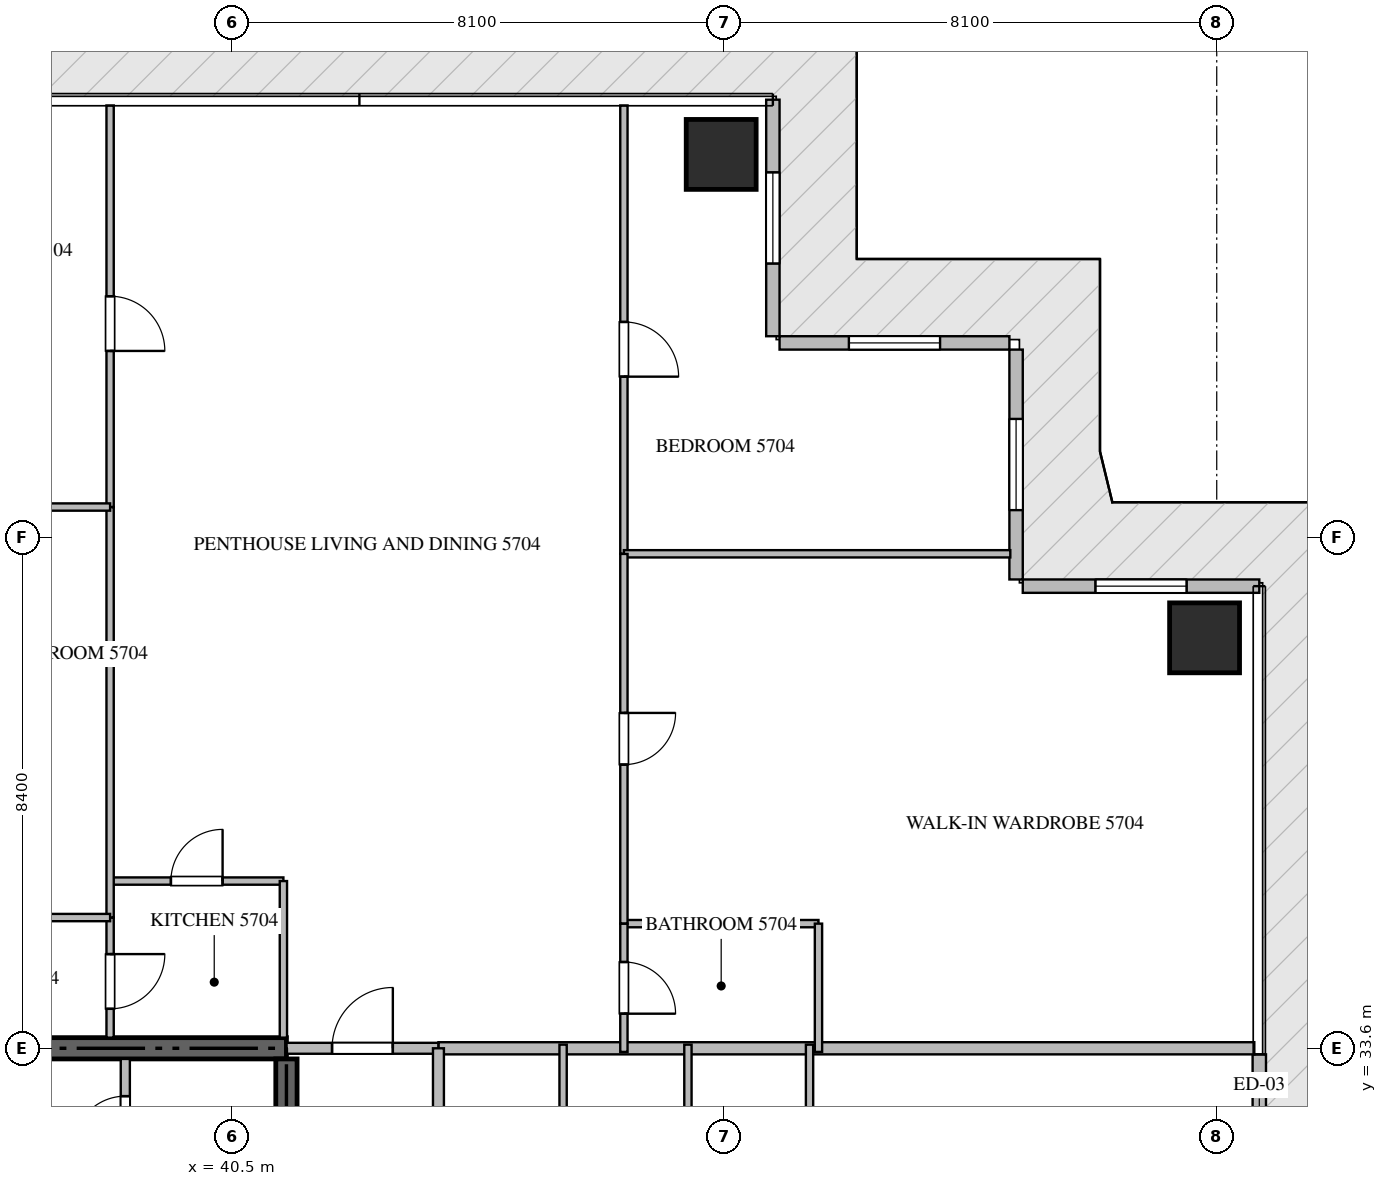
"""IFC4 building model, lengths in metres.
Left out: names, types, materials, properties, quantities, classifications, styles, units other than length and angle.
Written with IfcOpenShell. Run it as: python <this file> out.ifc"""

import sys

from ifc_helpers import new_model, si_unit, direction, frame, frame_2d, origin, origin_2d, place, context, subcontext, project, spatial, rectangle, extrude, source, transform, mapped, element, fill, save


model = new_model("IFC4")
c1 = context("Model", 3, precision=1e-05, world=origin(), true_north=direction((0.0, 1.0)))
c2 = subcontext(c1, "Body", "Model", "MODEL_VIEW")
j1 = project(units=[si_unit("LENGTHUNIT", "METRE"), si_unit("PLANEANGLEUNIT", "RADIAN")], contexts=[c1])
p1 = place(None, origin())
s1 = spatial("IfcSite", under=j1, at=p1, CompositionType="ELEMENT")
p2 = place(p1, origin())
s2 = spatial("IfcBuilding", under=s1, at=p2, CompositionType="ELEMENT")
p3 = place(p2, frame((0.0, 0.0, 229.7)))
s3 = spatial("IfcBuildingStorey", under=s2, at=p3, CompositionType="ELEMENT", Elevation=229.7)
p4 = place(p3, frame((41.4, 33.6, -0.26), z_axis=(0.0, 0.0, 1.0), x_axis=(-1.0, 0.0, 0.0)))
e1 = element("IfcWall", 1, at=p4, inside=s3, PredefinedType="SHEAR", context=c2, shape_type="SweptSolid", body=[
    extrude(rectangle(XDim=18.0, YDim=0.35, at=frame_2d((9.0, 0.0))), origin(), (0.0, 0.0, 1.0), 3.848),
])
p5 = place(p3, frame((41.4, 27.75, -0.26), z_axis=(0.0, 0.0, 1.0), x_axis=(0.0, 1.0, 0.0)))
e2 = element("IfcWall", 2, at=p5, inside=s3, PredefinedType="SHEAR", context=c2, shape_type="SweptSolid", body=[
    extrude(rectangle(XDim=5.675, YDim=0.35, at=frame_2d((2.837, 0.0))), origin(), (0.0, 0.0, 1.0), 3.848),
])
m1 = source(origin(), c2, "Body", "SweptSolid", [
    extrude(rectangle(XDim=1.15, YDim=1.15, at=origin_2d()), origin(), (0.0, 0.0, 1.0), 3.85),
])
for number, where, z_axis, x_axis in (
    (3, (48.55, 48.3, -0.26), (0.0, 0.0, 1.0), (1.0, 0.0, 0.0)),
    (4, (56.5, 40.35, -0.26), (0.0, 0.0, 1.0), (1.0, 0.0, 0.0)),
):
    element("IfcColumn", number, at=place(p3, frame(where, z_axis=z_axis, x_axis=x_axis)), inside=s3, PredefinedType="COLUMN", context=c2, shape_type="MappedRepresentation", body=[
        mapped(m1, transform((0.0, 0.0, 0.0), scale=1.0)),
    ])
p6 = place(p3, frame((57.4, 30.5, 0.0), z_axis=(0.0, 0.0, 1.0), x_axis=(0.0, 1.0, 0.0)))
e5 = element("IfcWall", 5, at=p6, inside=s3, PredefinedType="ELEMENTEDWALL", context=c2, shape_type="SweptSolid", body=[
    extrude(rectangle(XDim=3.0, YDim=0.22, at=frame_2d((1.5, 0.0))), origin(), (0.0, 0.0, 1.0), 3.575),
])
p7 = place(p6, frame((0.95, 0.0, 0.0)))
e6 = element("IfcOpeningElement", 6, at=p7, cuts=e5, PredefinedType="OPENING", context=c2, shape_type="SweptSolid", body=[
    extrude(rectangle(XDim=1.1, YDim=2.2, at=frame_2d((0.55, 1.1))), frame((0.0, 0.12, 0.0), z_axis=(0.0, -1.0, 0.0), x_axis=(1.0, 0.0, 0.0)), (0.0, 0.0, 1.0), 0.24),
])
p8 = place(p3, frame((57.4, 41.2, 0.0), z_axis=(0.0, 0.0, 1.0), x_axis=(-1.0, 0.0, 0.0)))
e7 = element("IfcWall", 7, at=p8, inside=s3, PredefinedType="ELEMENTEDWALL", context=c2, shape_type="SweptSolid", body=[
    extrude(rectangle(XDim=3.89, YDim=0.22, at=frame_2d((1.945, 0.0))), origin(), (0.0, 0.0, 1.0), 3.575),
])
p9 = place(p8, frame((1.195, 0.0, 0.65)))
e8 = element("IfcOpeningElement", 8, at=p9, cuts=e7, PredefinedType="OPENING", context=c2, shape_type="SweptSolid", body=[
    extrude(rectangle(XDim=1.5, YDim=2.25, at=frame_2d((0.75, 1.125))), frame((0.0, 0.12, 0.0), z_axis=(0.0, -1.0, 0.0), x_axis=(1.0, 0.0, 0.0)), (0.0, 0.0, 1.0), 0.24),
])
p10 = place(p3, frame((53.4, 41.31, 0.0), z_axis=(0.0, 0.0, 1.0), x_axis=(0.0, 1.0, 0.0)))
e9 = element("IfcWall", 9, at=p10, inside=s3, PredefinedType="ELEMENTEDWALL", context=c2, shape_type="SweptSolid", body=[
    extrude(rectangle(XDim=3.78, YDim=0.22, at=frame_2d((1.89, 0.0))), origin(), (0.0, 0.0, 1.0), 3.575),
])
p11 = place(p10, frame((1.14, 0.0, 0.65)))
e10 = element("IfcOpeningElement", 10, at=p11, cuts=e9, PredefinedType="OPENING", context=c2, shape_type="SweptSolid", body=[
    extrude(rectangle(XDim=1.5, YDim=2.25, at=frame_2d((0.75, 1.125))), frame((0.0, 0.12, 0.0), z_axis=(0.0, -1.0, 0.0), x_axis=(1.0, 0.0, 0.0)), (0.0, 0.0, 1.0), 0.24),
])
p12 = place(p3, frame((53.29, 45.2, 0.0), z_axis=(0.0, 0.0, 1.0), x_axis=(-1.0, 0.0, 0.0)))
e11 = element("IfcWall", 11, at=p12, inside=s3, PredefinedType="ELEMENTEDWALL", context=c2, shape_type="SweptSolid", body=[
    extrude(rectangle(XDim=3.78, YDim=0.22, at=frame_2d((1.89, 0.0))), origin(), (0.0, 0.0, 1.0), 3.575),
])
p13 = place(p12, frame((1.14, 0.0, 0.65)))
e12 = element("IfcOpeningElement", 12, at=p13, cuts=e11, PredefinedType="OPENING", context=c2, shape_type="SweptSolid", body=[
    extrude(rectangle(XDim=1.5, YDim=2.25, at=frame_2d((0.75, 1.125))), frame((0.0, 0.12, 0.0), z_axis=(0.0, -1.0, 0.0), x_axis=(1.0, 0.0, 0.0)), (0.0, 0.0, 1.0), 0.24),
])
p14 = place(p3, frame((49.4, 45.31, 0.0), z_axis=(0.0, 0.0, 1.0), x_axis=(0.0, 1.0, 0.0)))
e13 = element("IfcWall", 13, at=p14, inside=s3, PredefinedType="ELEMENTEDWALL", context=c2, shape_type="SweptSolid", body=[
    extrude(rectangle(XDim=3.89, YDim=0.22, at=frame_2d((1.945, 0.0))), origin(), (0.0, 0.0, 1.0), 3.575),
])
p15 = place(p14, frame((1.195, 0.0, 0.65)))
e14 = element("IfcOpeningElement", 14, at=p15, cuts=e13, PredefinedType="OPENING", context=c2, shape_type="SweptSolid", body=[
    extrude(rectangle(XDim=1.5, YDim=2.25, at=frame_2d((0.75, 1.125))), frame((0.0, 0.12, 0.0), z_axis=(0.0, -1.0, 0.0), x_axis=(1.0, 0.0, 0.0)), (0.0, 0.0, 1.0), 0.24),
])
p16 = place(p3, frame((38.75, 31.352, 0.0), z_axis=(0.0, 0.0, 1.0), x_axis=(0.0, 1.0, 0.0)))
e15 = element("IfcWall", 15, at=p16, inside=s3, PredefinedType="PARTITIONING", context=c2, shape_type="SweptSolid", body=[
    extrude(rectangle(XDim=2.073, YDim=0.15, at=frame_2d((1.037, 0.0))), origin(), (0.0, 0.0, 1.0), 3.59),
])
p17 = place(p16, frame((0.611, 0.0, 0.0)))
e16 = element("IfcOpeningElement", 16, at=p17, cuts=e15, PredefinedType="OPENING", context=c2, shape_type="SweptSolid", body=[
    extrude(rectangle(XDim=0.85, YDim=2.1, at=frame_2d((0.425, 1.05))), frame((0.0, 0.085, 0.0), z_axis=(0.0, -1.0, 0.0), x_axis=(1.0, 0.0, 0.0)), (0.0, 0.0, 1.0), 0.17),
])
p18 = place(p3, frame((43.9, 33.6, 0.0), z_axis=(0.0, 0.0, 1.0), x_axis=(1.0, 0.0, 0.0)))
e17 = element("IfcWall", 17, at=p18, inside=s3, PredefinedType="PARTITIONING", context=c2, shape_type="SweptSolid", body=[
    extrude(rectangle(XDim=13.418, YDim=0.2, at=frame_2d((6.709, 0.0))), origin(), (0.0, 0.0, 1.0), 3.59),
])
p19 = place(p3, frame((41.402, 33.6, 0.0), z_axis=(0.0, 0.0, 1.0), x_axis=(1.0, 0.0, 0.0)))
e18 = element("IfcWall", 18, at=p19, inside=s3, PredefinedType="PARTITIONING", context=c2, shape_type="SweptSolid", body=[
    extrude(rectangle(XDim=2.496, YDim=0.18, at=frame_2d((1.248, 0.0))), origin(), (0.0, 0.0, 1.0), 3.59),
])
p20 = place(p19, frame((0.748, 0.0, 0.0)))
e19 = element("IfcOpeningElement", 19, at=p20, cuts=e18, PredefinedType="OPENING", context=c2, shape_type="SweptSolid", body=[
    extrude(rectangle(XDim=1.0, YDim=2.15, at=frame_2d((0.5, 1.075))), frame((0.0, 0.1, 0.0), z_axis=(0.0, -1.0, 0.0), x_axis=(1.0, 0.0, 0.0)), (0.0, 0.0, 1.0), 0.2),
])
p21 = place(p3, frame((43.9, 16.8, 0.0), z_axis=(0.0, 0.0, 1.0), x_axis=(0.0, 1.0, 0.0)))
e20 = element("IfcWall", 20, at=p21, inside=s3, PredefinedType="PARTITIONING", context=c2, shape_type="SweptSolid", body=[
    extrude(rectangle(XDim=16.8, YDim=0.18, at=frame_2d((8.4, 0.0))), origin(), (0.0, 0.0, 1.0), 3.59),
])
p22 = place(p21, frame((4.392, 0.0, 0.0)))
e21 = element("IfcOpeningElement", 21, at=p22, cuts=e20, PredefinedType="OPENING", context=c2, shape_type="SweptSolid", body=[
    extrude(rectangle(XDim=1.0, YDim=2.15, at=frame_2d((0.5, 1.075))), frame((0.0, 0.1, 0.0), z_axis=(0.0, -1.0, 0.0), x_axis=(1.0, 0.0, 0.0)), (0.0, 0.0, 1.0), 0.2),
])
p23 = place(p21, frame((8.595, 0.0, 0.0)))
e22 = element("IfcOpeningElement", 22, at=p23, cuts=e20, PredefinedType="OPENING", context=c2, shape_type="SweptSolid", body=[
    extrude(rectangle(XDim=1.0, YDim=2.15, at=frame_2d((0.5, 1.075))), frame((0.0, 0.1, 0.0), z_axis=(0.0, -1.0, 0.0), x_axis=(1.0, 0.0, 0.0)), (0.0, 0.0, 1.0), 0.2),
])
p24 = place(p3, frame((38.5, 36.35, 0.0), z_axis=(0.0, 0.0, 1.0), x_axis=(1.0, 0.0, 0.0)))
e23 = element("IfcWall", 23, at=p24, inside=s3, PredefinedType="PARTITIONING", context=c2, shape_type="SweptSolid", body=[
    extrude(rectangle(XDim=2.85, YDim=0.12, at=frame_2d((1.425, 0.0))), origin(), (0.0, 0.0, 1.0), 3.59),
])
p25 = place(p24, frame((1.0, 0.0, 0.0)))
e24 = element("IfcOpeningElement", 24, at=p25, cuts=e23, PredefinedType="OPENING", context=c2, shape_type="SweptSolid", body=[
    extrude(rectangle(XDim=0.85, YDim=2.1, at=frame_2d((0.425, 1.05))), frame((0.0, 0.07, 0.0), z_axis=(0.0, -1.0, 0.0), x_axis=(1.0, 0.0, 0.0)), (0.0, 0.0, 1.0), 0.14),
])
p26 = place(p3, frame((41.35, 36.35, 0.0), z_axis=(0.0, 0.0, 1.0), x_axis=(0.0, -1.0, 0.0)))
e25 = element("IfcWall", 25, at=p26, inside=s3, PredefinedType="PARTITIONING", context=c2, shape_type="SweptSolid", body=[
    extrude(rectangle(XDim=2.575, YDim=0.12, at=frame_2d((1.288, 0.0))), origin(), (0.0, 0.0, 1.0), 3.59),
])
p27 = place(p3, frame((38.5, 35.75, 0.0), z_axis=(0.0, 0.0, 1.0), x_axis=(0.0, -1.0, 0.0)))
e26 = element("IfcWall", 26, at=p27, inside=s3, PredefinedType="PARTITIONING", context=c2, shape_type="SweptSolid", body=[
    extrude(rectangle(XDim=1.975, YDim=0.12, at=frame_2d((0.988, 0.0))), origin(), (0.0, 0.0, 1.0), 3.59),
])
p28 = place(p27, frame((0.601, 0.0, 0.0)))
e27 = element("IfcOpeningElement", 27, at=p28, cuts=e26, PredefinedType="OPENING", context=c2, shape_type="SweptSolid", body=[
    extrude(rectangle(XDim=0.9, YDim=2.1, at=frame_2d((0.45, 1.05))), frame((0.0, 0.07, 0.0), z_axis=(0.0, -1.0, 0.0), x_axis=(1.0, 0.0, 0.0)), (0.0, 0.0, 1.0), 0.14),
])
p29 = place(p3, frame((38.5, 49.105, 0.0), z_axis=(0.0, 0.0, 1.0), x_axis=(0.0, -1.0, 0.0)))
e28 = element("IfcWall", 28, at=p29, inside=s3, PredefinedType="PARTITIONING", context=c2, shape_type="SweptSolid", body=[
    extrude(rectangle(XDim=6.604, YDim=0.12, at=frame_2d((3.302, 0.0))), origin(), (0.0, 0.0, 1.0), 3.59),
])
p30 = place(p29, frame((3.137, 0.0, 0.0)))
e29 = element("IfcOpeningElement", 29, at=p30, cuts=e28, PredefinedType="OPENING", context=c2, shape_type="SweptSolid", body=[
    extrude(rectangle(XDim=0.9, YDim=2.1, at=frame_2d((0.45, 1.05))), frame((0.0, 0.07, 0.0), z_axis=(0.0, -1.0, 0.0), x_axis=(1.0, 0.0, 0.0)), (0.0, 0.0, 1.0), 0.14),
])
p31 = place(p3, frame((38.5, 42.499, 0.0), z_axis=(0.0, 0.0, 1.0), x_axis=(0.0, -1.0, 0.0)))
e30 = element("IfcWall", 30, at=p31, inside=s3, PredefinedType="PARTITIONING", context=c2, shape_type="SweptSolid", body=[
    extrude(rectangle(XDim=6.747, YDim=0.12, at=frame_2d((3.374, 0.0))), origin(), (0.0, 0.0, 1.0), 3.59),
])
p32 = place(p3, frame((33.38, 42.501, 0.0), z_axis=(0.0, 0.0, 1.0), x_axis=(1.0, 0.0, 0.0)))
e31 = element("IfcWall", 31, at=p32, inside=s3, PredefinedType="PARTITIONING", context=c2, shape_type="SweptSolid", body=[
    extrude(rectangle(XDim=5.12, YDim=0.12, at=frame_2d((2.56, 0.0))), origin(), (0.0, 0.0, 1.0), 3.59),
])
p33 = place(p3, frame((35.482, 35.75, 0.0), z_axis=(0.0, 0.0, 1.0), x_axis=(1.0, 0.0, 0.0)))
e32 = element("IfcWall", 32, at=p33, inside=s3, PredefinedType="PARTITIONING", context=c2, shape_type="SweptSolid", body=[
    extrude(rectangle(XDim=3.018, YDim=0.12, at=frame_2d((1.509, 0.0))), origin(), (0.0, 0.0, 1.0), 3.59),
])
p34 = place(p33, frame((1.084, 0.0, 0.0)))
e33 = element("IfcOpeningElement", 33, at=p34, cuts=e32, PredefinedType="OPENING", context=c2, shape_type="SweptSolid", body=[
    extrude(rectangle(XDim=0.85, YDim=2.1, at=frame_2d((0.425, 1.05))), frame((0.0, 0.07, 0.0), z_axis=(0.0, -1.0, 0.0), x_axis=(1.0, 0.0, 0.0)), (0.0, 0.0, 1.0), 0.14),
])
p35 = place(p3, frame((46.95, 49.105, 0.0), z_axis=(0.0, 0.0, 1.0), x_axis=(0.0, -1.0, 0.0)))
e34 = element("IfcWall", 34, at=p35, inside=s3, PredefinedType="PARTITIONING", context=c2, shape_type="SweptSolid", body=[
    extrude(rectangle(XDim=7.373, YDim=0.12, at=frame_2d((3.687, 0.0))), origin(), (0.0, 0.0, 1.0), 3.59),
])
p36 = place(p35, frame((3.56, 0.0, 0.0)))
e35 = element("IfcOpeningElement", 35, at=p36, cuts=e34, PredefinedType="OPENING", context=c2, shape_type="SweptSolid", body=[
    extrude(rectangle(XDim=0.9, YDim=2.1, at=frame_2d((0.45, 1.05))), frame((0.0, 0.07, 0.0), z_axis=(0.0, -1.0, 0.0), x_axis=(1.0, 0.0, 0.0)), (0.0, 0.0, 1.0), 0.14),
])
p37 = place(p3, frame((46.95, 41.732, 0.0), z_axis=(0.0, 0.0, 1.0), x_axis=(1.0, 0.0, 0.0)))
e36 = element("IfcWall", 36, at=p37, inside=s3, PredefinedType="PARTITIONING", context=c2, shape_type="SweptSolid", body=[
    extrude(rectangle(XDim=6.355, YDim=0.12, at=frame_2d((3.177, 0.0))), origin(), (0.0, 0.0, 1.0), 3.59),
])
p38 = place(p3, frame((46.95, 35.65, 0.0), z_axis=(0.0, 0.0, 1.0), x_axis=(1.0, 0.0, 0.0)))
e37 = element("IfcWall", 37, at=p38, inside=s3, PredefinedType="PARTITIONING", context=c2, shape_type="SweptSolid", body=[
    extrude(rectangle(XDim=3.2, YDim=0.12, at=frame_2d((1.6, 0.0))), origin(), (0.0, 0.0, 1.0), 3.59),
])
p39 = place(p3, frame((50.15, 35.65, 0.0), z_axis=(0.0, 0.0, 1.0), x_axis=(0.0, -1.0, 0.0)))
e38 = element("IfcWall", 38, at=p39, inside=s3, PredefinedType="PARTITIONING", context=c2, shape_type="SweptSolid", body=[
    extrude(rectangle(XDim=2.11, YDim=0.12, at=frame_2d((1.055, 0.0))), origin(), (0.0, 0.0, 1.0), 3.59),
])
p40 = place(p3, frame((46.95, 41.73, 0.0), z_axis=(0.0, 0.0, 1.0), x_axis=(0.0, -1.0, 0.0)))
e39 = element("IfcWall", 39, at=p40, inside=s3, PredefinedType="PARTITIONING", context=c2, shape_type="SweptSolid", body=[
    extrude(rectangle(XDim=6.08, YDim=0.12, at=frame_2d((3.04, 0.0))), origin(), (0.0, 0.0, 1.0), 3.59),
])
p41 = place(p40, frame((2.615, 0.0, 0.0)))
e40 = element("IfcOpeningElement", 40, at=p41, cuts=e39, PredefinedType="OPENING", context=c2, shape_type="SweptSolid", body=[
    extrude(rectangle(XDim=0.85, YDim=2.1, at=frame_2d((0.425, 1.05))), frame((0.0, 0.07, 0.0), z_axis=(0.0, -1.0, 0.0), x_axis=(1.0, 0.0, 0.0)), (0.0, 0.0, 1.0), 0.14),
])
p42 = place(p3, frame((46.95, 35.648, 0.0), z_axis=(0.0, 0.0, 1.0), x_axis=(0.0, -1.0, 0.0)))
e41 = element("IfcWall", 41, at=p42, inside=s3, PredefinedType="PARTITIONING", context=c2, shape_type="SweptSolid", body=[
    extrude(rectangle(XDim=2.108, YDim=0.12, at=frame_2d((1.054, 0.0))), origin(), (0.0, 0.0, 1.0), 3.59),
])
p43 = place(p42, frame((0.629, 0.0, 0.0)))
e42 = element("IfcOpeningElement", 42, at=p43, cuts=e41, PredefinedType="OPENING", context=c2, shape_type="SweptSolid", body=[
    extrude(rectangle(XDim=0.85, YDim=2.1, at=frame_2d((0.425, 1.05))), frame((0.0, 0.07, 0.0), z_axis=(0.0, -1.0, 0.0), x_axis=(1.0, 0.0, 0.0)), (0.0, 0.0, 1.0), 0.14),
])
for number, where, z_axis, x_axis in (
    (43, (50.003, 27.8, 0.0), (0.0, 0.0, 1.0), (0.0, 1.0, 0.0)),
    (44, (48.003, 27.8, 0.0), (0.0, 0.0, 1.0), (0.0, 1.0, 0.0)),
    (45, (45.95, 27.8, 0.0), (0.0, 0.0, 1.0), (0.0, 1.0, 0.0)),
):
    element("IfcWall", number, at=place(p3, frame(where, z_axis=z_axis, x_axis=x_axis)), inside=s3, PredefinedType="PARTITIONING", context=c2, shape_type="SweptSolid", body=[
        extrude(rectangle(XDim=5.86, YDim=0.12, at=frame_2d((2.93, 0.0))), origin(), (0.0, 0.0, 1.0), 3.59),
    ])
m2 = source(origin(), c2, "Body", "SweptSolid", [
    extrude(rectangle(XDim=1.5, YDim=2.25, at=frame_2d((0.75, 1.125))), frame((0.0, 0.03, 0.0), z_axis=(0.0, -1.0, 0.0), x_axis=(1.0, 0.0, 0.0)), (0.0, 0.0, 1.0), 0.06),
])
p44 = place(p9, origin())
e46 = element("IfcWindow", 46, at=p44, inside=s3, PartitioningType="SINGLE_PANEL", PredefinedType="WINDOW", context=c2, shape_type="MappedRepresentation", body=[
    mapped(m2, transform((0.0, 0.0, 0.0), scale=1.0)),
])
fill(e8, e46)
p45 = place(p11, origin())
e47 = element("IfcWindow", 47, at=p45, inside=s3, PartitioningType="SINGLE_PANEL", PredefinedType="WINDOW", context=c2, shape_type="MappedRepresentation", body=[
    mapped(m2, transform((0.0, 0.0, 0.0), scale=1.0)),
])
fill(e10, e47)
p46 = place(p13, origin())
e48 = element("IfcWindow", 48, at=p46, inside=s3, PartitioningType="SINGLE_PANEL", PredefinedType="WINDOW", context=c2, shape_type="MappedRepresentation", body=[
    mapped(m2, transform((0.0, 0.0, 0.0), scale=1.0)),
])
fill(e12, e48)
p47 = place(p15, origin())
e49 = element("IfcWindow", 49, at=p47, inside=s3, PartitioningType="SINGLE_PANEL", PredefinedType="WINDOW", context=c2, shape_type="MappedRepresentation", body=[
    mapped(m2, transform((0.0, 0.0, 0.0), scale=1.0)),
])
fill(e14, e49)
m3 = source(origin(), c2, "Body", "SweptSolid", [
    extrude(rectangle(XDim=0.85, YDim=2.1, at=frame_2d((0.425, 1.05))), frame((0.0, 0.025, 0.0), z_axis=(0.0, -1.0, 0.0), x_axis=(1.0, 0.0, 0.0)), (0.0, 0.0, 1.0), 0.05),
])
p48 = place(p17, origin())
e50 = element("IfcDoor", 50, at=p48, inside=s3, OperationType="SINGLE_SWING_LEFT", PredefinedType="DOOR", context=c2, shape_type="MappedRepresentation", body=[
    mapped(m3, transform((0.0, 0.0, 0.0), scale=1.0)),
])
fill(e16, e50)
m4 = source(origin(), c2, "Body", "SweptSolid", [
    extrude(rectangle(XDim=1.0, YDim=2.15, at=frame_2d((0.5, 1.075))), frame((0.0, 0.025, 0.0), z_axis=(0.0, -1.0, 0.0), x_axis=(1.0, 0.0, 0.0)), (0.0, 0.0, 1.0), 0.05),
])
p49 = place(p20, origin())
e51 = element("IfcDoor", 51, at=p49, inside=s3, OperationType="SINGLE_SWING_RIGHT", PredefinedType="DOOR", context=c2, shape_type="MappedRepresentation", body=[
    mapped(m4, transform((0.0, 0.0, 0.0), scale=1.0)),
])
fill(e19, e51)
p50 = place(p25, origin())
e52 = element("IfcDoor", 52, at=p50, inside=s3, OperationType="SINGLE_SWING_RIGHT", PredefinedType="DOOR", context=c2, shape_type="MappedRepresentation", body=[
    mapped(m3, transform((0.0, 0.0, 0.0), scale=1.0)),
])
fill(e24, e52)
m5 = source(origin(), c2, "Body", "SweptSolid", [
    extrude(rectangle(XDim=0.9, YDim=2.1, at=frame_2d((0.45, 1.05))), frame((0.0, 0.025, 0.0), z_axis=(0.0, -1.0, 0.0), x_axis=(1.0, 0.0, 0.0)), (0.0, 0.0, 1.0), 0.05),
])
p51 = place(p28, origin())
e53 = element("IfcDoor", 53, at=p51, inside=s3, OperationType="SINGLE_SWING_LEFT", PredefinedType="DOOR", context=c2, shape_type="MappedRepresentation", body=[
    mapped(m5, transform((0.0, 0.0, 0.0), scale=1.0)),
])
fill(e27, e53)
p52 = place(p30, origin())
e54 = element("IfcDoor", 54, at=p52, inside=s3, OperationType="SINGLE_SWING_RIGHT", PredefinedType="DOOR", context=c2, shape_type="MappedRepresentation", body=[
    mapped(m5, transform((0.0, 0.0, 0.0), scale=1.0)),
])
fill(e29, e54)
p53 = place(p36, origin())
e55 = element("IfcDoor", 55, at=p53, inside=s3, OperationType="SINGLE_SWING_RIGHT", PredefinedType="DOOR", context=c2, shape_type="MappedRepresentation", body=[
    mapped(m5, transform((0.0, 0.0, 0.0), scale=1.0)),
])
fill(e35, e55)
p54 = place(p41, origin())
e56 = element("IfcDoor", 56, at=p54, inside=s3, OperationType="SINGLE_SWING_LEFT", PredefinedType="DOOR", context=c2, shape_type="MappedRepresentation", body=[
    mapped(m3, transform((0.0, 0.0, 0.0), scale=1.0)),
])
fill(e40, e56)
p55 = place(p43, origin())
e57 = element("IfcDoor", 57, at=p55, inside=s3, OperationType="SINGLE_SWING_RIGHT", PredefinedType="DOOR", context=c2, shape_type="MappedRepresentation", body=[
    mapped(m3, transform((0.0, 0.0, 0.0), scale=1.0)),
])
fill(e42, e57)
save(model, sys.argv[1])
